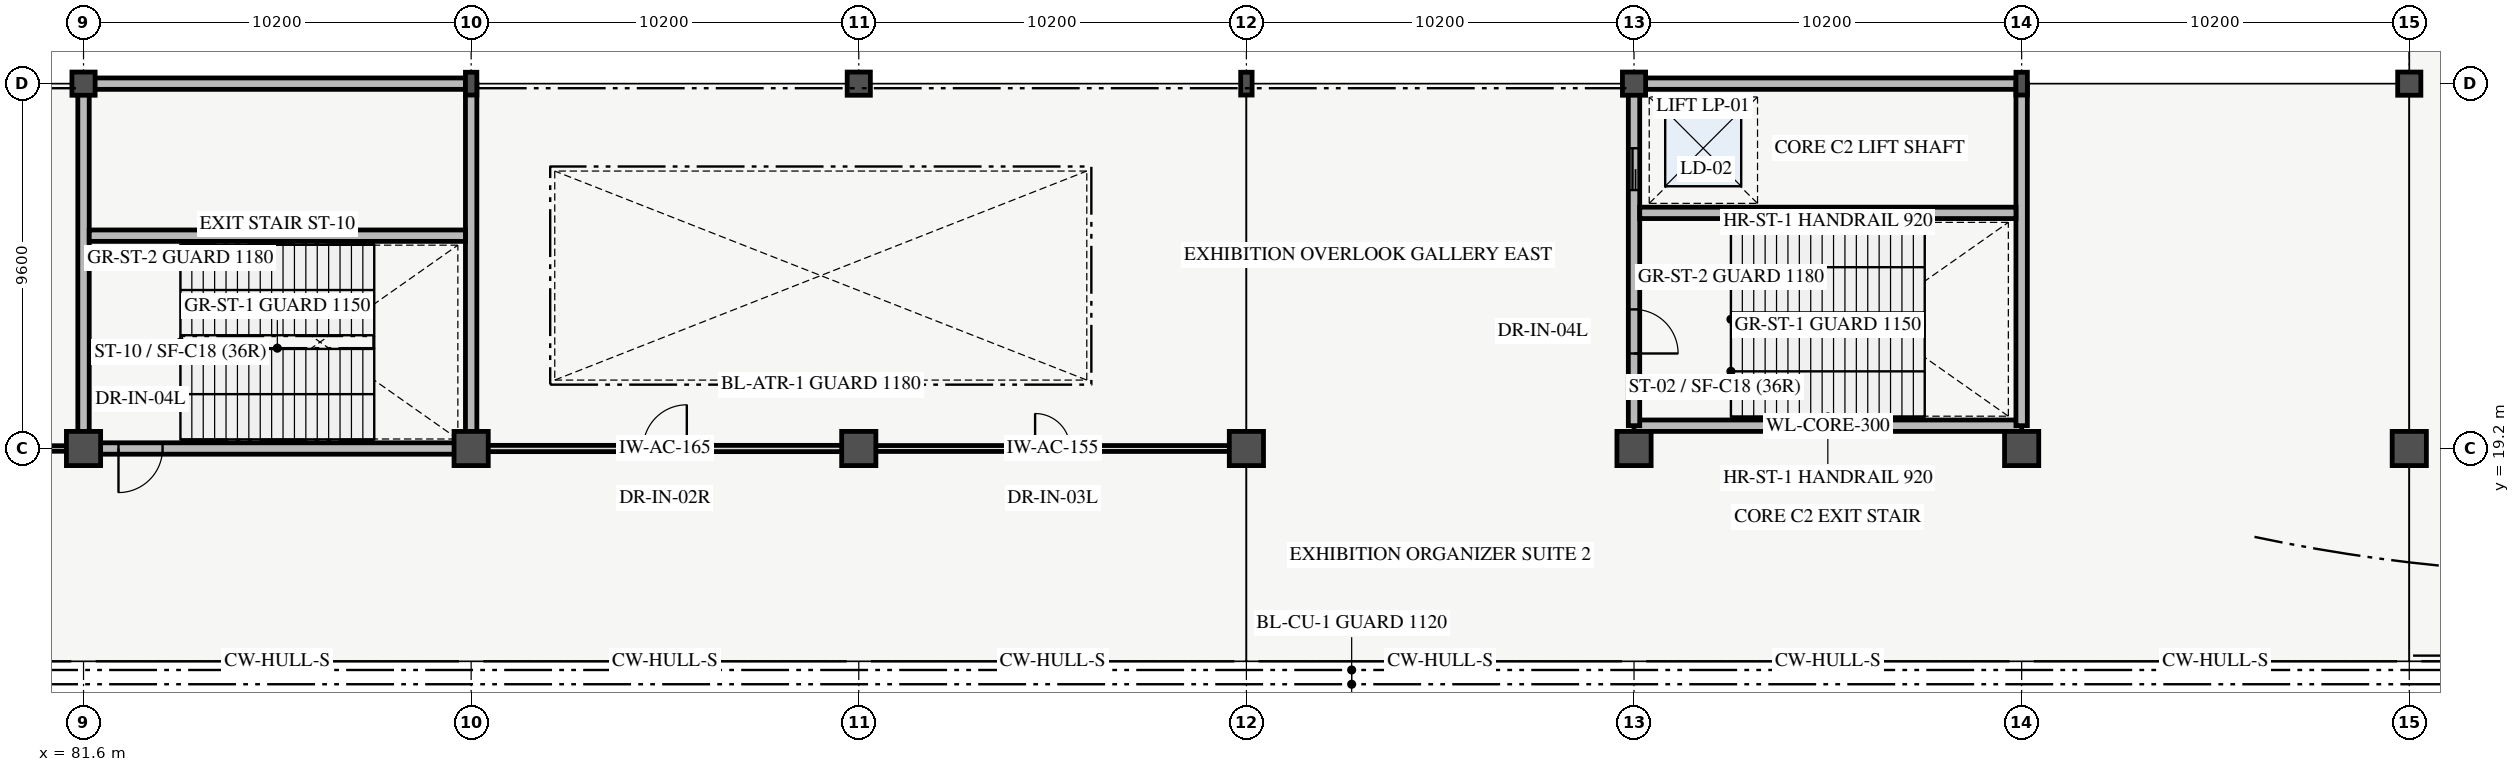
"""IFC4 building model, lengths in metres.
Left out: names, types, materials, properties, quantities, classifications, styles, units other than length and angle.
Written with IfcOpenShell. Run it as: python <this file> out.ifc"""

import sys

from ifc_helpers import new_model, si_unit, direction, frame, frame_2d, origin, origin_2d, place, context, subcontext, project, spatial, rectangle, hollow_circle, i_section, extrude, element, fill, save


model = new_model("IFC4")
c1 = context("Model", 3, precision=1e-05, world=origin(), true_north=direction((0.0, 1.0)))
c2 = subcontext(c1, "Body", "Model", "MODEL_VIEW")
j1 = project(units=[si_unit("LENGTHUNIT", "METRE"), si_unit("PLANEANGLEUNIT", "RADIAN")], contexts=[c1])
p1 = place(None, origin())
s1 = spatial("IfcSite", under=j1, at=p1, CompositionType="ELEMENT")
p2 = place(p1, origin())
s2 = spatial("IfcBuilding", under=s1, at=p2, CompositionType="ELEMENT")
p3 = place(p2, frame((0.0, 0.0, 5.4)))
s3 = spatial("IfcBuildingStorey", under=s2, at=p3, CompositionType="ELEMENT", Elevation=5.4)
p4 = place(p3, frame((81.6, 19.2, 0.0), z_axis=(0.0, 0.0, 1.0), x_axis=(1.0, 0.0, 0.0)))
e1 = element("IfcColumn", 1, at=p4, inside=s3, PredefinedType="COLUMN", context=c2, shape_type="SweptSolid", body=[
    extrude(rectangle(XDim=0.9, YDim=0.9, at=origin_2d()), origin(), (0.0, 0.0, 1.0), 5.4),
])
p5 = place(p3, frame((81.6, 28.8, 0.0), z_axis=(0.0, 0.0, 1.0), x_axis=(1.0, 0.0, 0.0)))
e2 = element("IfcColumn", 2, at=p5, inside=s3, PredefinedType="COLUMN", context=c2, shape_type="SweptSolid", body=[
    extrude(hollow_circle(Radius=0.305, WallThickness=0.025, at=origin_2d()), origin(), (0.0, 0.0, 1.0), 5.4),
])
p6 = place(p3, frame((91.8, 19.2, 0.0), z_axis=(0.0, 0.0, 1.0), x_axis=(1.0, 0.0, 0.0)))
e3 = element("IfcColumn", 3, at=p6, inside=s3, PredefinedType="COLUMN", context=c2, shape_type="SweptSolid", body=[
    extrude(rectangle(XDim=0.9, YDim=0.9, at=origin_2d()), origin(), (0.0, 0.0, 1.0), 5.4),
])
p7 = place(p3, frame((91.8, 28.8, 0.0), z_axis=(0.0, 0.0, 1.0), x_axis=(1.0, 0.0, 0.0)))
e4 = element("IfcColumn", 4, at=p7, inside=s3, PredefinedType="COLUMN", context=c2, shape_type="SweptSolid", body=[
    extrude(i_section(OverallWidth=0.3, OverallDepth=0.6, WebThickness=0.015, FlangeThickness=0.03, FilletRadius=0.027, at=origin_2d()), origin(), (0.0, 0.0, 1.0), 5.4),
])
p8 = place(p3, frame((102.0, 19.2, 0.0), z_axis=(0.0, 0.0, 1.0), x_axis=(1.0, 0.0, 0.0)))
e5 = element("IfcColumn", 5, at=p8, inside=s3, PredefinedType="COLUMN", context=c2, shape_type="SweptSolid", body=[
    extrude(rectangle(XDim=0.9, YDim=0.9, at=origin_2d()), origin(), (0.0, 0.0, 1.0), 5.4),
])
p9 = place(p3, frame((102.0, 28.8, 0.0), z_axis=(0.0, 0.0, 1.0), x_axis=(1.0, 0.0, 0.0)))
e6 = element("IfcColumn", 6, at=p9, inside=s3, PredefinedType="COLUMN", context=c2, shape_type="SweptSolid", body=[
    extrude(hollow_circle(Radius=0.305, WallThickness=0.025, at=origin_2d()), origin(), (0.0, 0.0, 1.0), 5.4),
])
p10 = place(p3, frame((112.2, 19.2, 0.0), z_axis=(0.0, 0.0, 1.0), x_axis=(1.0, 0.0, 0.0)))
e7 = element("IfcColumn", 7, at=p10, inside=s3, PredefinedType="COLUMN", context=c2, shape_type="SweptSolid", body=[
    extrude(rectangle(XDim=0.9, YDim=0.9, at=origin_2d()), origin(), (0.0, 0.0, 1.0), 5.4),
])
p11 = place(p3, frame((112.2, 28.8, 0.0), z_axis=(0.0, 0.0, 1.0), x_axis=(1.0, 0.0, 0.0)))
e8 = element("IfcColumn", 8, at=p11, inside=s3, PredefinedType="COLUMN", context=c2, shape_type="SweptSolid", body=[
    extrude(i_section(OverallWidth=0.3, OverallDepth=0.6, WebThickness=0.015, FlangeThickness=0.03, FilletRadius=0.027, at=origin_2d()), origin(), (0.0, 0.0, 1.0), 5.4),
])
p12 = place(p3, frame((122.4, 19.2, 0.0), z_axis=(0.0, 0.0, 1.0), x_axis=(1.0, 0.0, 0.0)))
e9 = element("IfcColumn", 9, at=p12, inside=s3, PredefinedType="COLUMN", context=c2, shape_type="SweptSolid", body=[
    extrude(rectangle(XDim=0.9, YDim=0.9, at=origin_2d()), origin(), (0.0, 0.0, 1.0), 5.4),
])
p13 = place(p3, frame((122.4, 28.8, 0.0), z_axis=(0.0, 0.0, 1.0), x_axis=(1.0, 0.0, 0.0)))
e10 = element("IfcColumn", 10, at=p13, inside=s3, PredefinedType="COLUMN", context=c2, shape_type="SweptSolid", body=[
    extrude(hollow_circle(Radius=0.305, WallThickness=0.025, at=origin_2d()), origin(), (0.0, 0.0, 1.0), 5.4),
])
p14 = place(p3, frame((132.6, 19.2, 0.0), z_axis=(0.0, 0.0, 1.0), x_axis=(1.0, 0.0, 0.0)))
e11 = element("IfcColumn", 11, at=p14, inside=s3, PredefinedType="COLUMN", context=c2, shape_type="SweptSolid", body=[
    extrude(rectangle(XDim=0.9, YDim=0.9, at=origin_2d()), origin(), (0.0, 0.0, 1.0), 5.4),
])
p15 = place(p3, frame((132.6, 28.8, 0.0), z_axis=(0.0, 0.0, 1.0), x_axis=(1.0, 0.0, 0.0)))
e12 = element("IfcColumn", 12, at=p15, inside=s3, PredefinedType="COLUMN", context=c2, shape_type="SweptSolid", body=[
    extrude(i_section(OverallWidth=0.3, OverallDepth=0.6, WebThickness=0.015, FlangeThickness=0.03, FilletRadius=0.027, at=origin_2d()), origin(), (0.0, 0.0, 1.0), 5.4),
])
p16 = place(p3, frame((142.8, 19.2, 0.0), z_axis=(0.0, 0.0, 1.0), x_axis=(1.0, 0.0, 0.0)))
e13 = element("IfcColumn", 13, at=p16, inside=s3, PredefinedType="COLUMN", context=c2, shape_type="SweptSolid", body=[
    extrude(rectangle(XDim=0.9, YDim=0.9, at=origin_2d()), origin(), (0.0, 0.0, 1.0), 5.4),
])
p17 = place(p3, frame((142.8, 28.8, 0.0), z_axis=(0.0, 0.0, 1.0), x_axis=(1.0, 0.0, 0.0)))
e14 = element("IfcColumn", 14, at=p17, inside=s3, PredefinedType="COLUMN", context=c2, shape_type="SweptSolid", body=[
    extrude(hollow_circle(Radius=0.305, WallThickness=0.025, at=origin_2d()), origin(), (0.0, 0.0, 1.0), 5.4),
])
for number, where, z_axis, x_axis in (
    (15, (122.4, 19.8, 0.0), (0.0, 0.0, 1.0), (1.0, 0.0, 0.0)),
    (16, (122.4, 28.8, 0.0), (0.0, 0.0, 1.0), (1.0, 0.0, 0.0)),
):
    element("IfcWall", number, at=place(p3, frame(where, z_axis=z_axis, x_axis=x_axis)), inside=s3, PredefinedType="SHEAR", context=c2, shape_type="SweptSolid", body=[
        extrude(rectangle(XDim=10.2, YDim=0.3, at=frame_2d((5.1, 0.0))), origin(), (0.0, 0.0, 1.0), 5.4),
    ])
p18 = place(p3, frame((122.4, 19.8, 0.0), z_axis=(0.0, 0.0, 1.0), x_axis=(0.0, 1.0, 0.0)))
e17 = element("IfcWall", 17, at=p18, inside=s3, PredefinedType="SHEAR", context=c2, shape_type="SweptSolid", body=[
    extrude(rectangle(XDim=9.0, YDim=0.3, at=frame_2d((4.5, 0.0))), origin(), (0.0, 0.0, 1.0), 5.4),
])
p19 = place(p18, frame((1.9, 0.0, 0.0)))
e18 = element("IfcOpeningElement", 18, at=p19, cuts=e17, PredefinedType="OPENING", context=c2, shape_type="SweptSolid", body=[
    extrude(rectangle(XDim=1.16, YDim=2.2, at=frame_2d((0.58, 1.1))), frame((0.0, 0.16, 0.0), z_axis=(0.0, -1.0, 0.0), x_axis=(1.0, 0.0, 0.0)), (0.0, 0.0, 1.0), 0.32),
])
p20 = place(p18, frame((6.2, 0.0, 0.0)))
e19 = element("IfcOpeningElement", 19, at=p20, cuts=e17, PredefinedType="OPENING", context=c2, shape_type="SweptSolid", body=[
    extrude(rectangle(XDim=1.1, YDim=2.2, at=frame_2d((0.55, 1.1))), frame((0.0, 0.16, 0.0), z_axis=(0.0, -1.0, 0.0), x_axis=(1.0, 0.0, 0.0)), (0.0, 0.0, 1.0), 0.32),
])
p21 = place(p3, frame((132.6, 19.8, 0.0), z_axis=(0.0, 0.0, 1.0), x_axis=(0.0, 1.0, 0.0)))
e20 = element("IfcWall", 20, at=p21, inside=s3, PredefinedType="SHEAR", context=c2, shape_type="SweptSolid", body=[
    extrude(rectangle(XDim=9.0, YDim=0.3, at=frame_2d((4.5, 0.0))), origin(), (0.0, 0.0, 1.0), 5.4),
])
p22 = place(p3, frame((122.55, 25.4, 0.0), z_axis=(0.0, 0.0, 1.0), x_axis=(1.0, 0.0, 0.0)))
e21 = element("IfcWall", 21, at=p22, inside=s3, PredefinedType="SHEAR", context=c2, shape_type="SweptSolid", body=[
    extrude(rectangle(XDim=9.9, YDim=0.3, at=frame_2d((4.95, 0.0))), origin(), (0.0, 0.0, 1.0), 5.4),
])
p23 = place(p3, frame((81.6, 19.2, 0.0), z_axis=(0.0, 0.0, 1.0), x_axis=(1.0, 0.0, 0.0)))
e22 = element("IfcWall", 22, at=p23, inside=s3, PredefinedType="SHEAR", context=c2, shape_type="SweptSolid", body=[
    extrude(rectangle(XDim=10.2, YDim=0.3, at=frame_2d((5.1, 0.0))), origin(), (0.0, 0.0, 1.0), 5.4),
])
p24 = place(p23, frame((0.92, 0.0, 0.0)))
e23 = element("IfcOpeningElement", 23, at=p24, cuts=e22, PredefinedType="OPENING", context=c2, shape_type="SweptSolid", body=[
    extrude(rectangle(XDim=1.16, YDim=2.2, at=frame_2d((0.58, 1.1))), frame((0.0, 0.16, 0.0), z_axis=(0.0, -1.0, 0.0), x_axis=(1.0, 0.0, 0.0)), (0.0, 0.0, 1.0), 0.32),
])
p25 = place(p3, frame((81.6, 28.8, 0.0), z_axis=(0.0, 0.0, 1.0), x_axis=(1.0, 0.0, 0.0)))
e24 = element("IfcWall", 24, at=p25, inside=s3, PredefinedType="SHEAR", context=c2, shape_type="SweptSolid", body=[
    extrude(rectangle(XDim=10.2, YDim=0.3, at=frame_2d((5.1, 0.0))), origin(), (0.0, 0.0, 1.0), 5.4),
])
for number, where, z_axis, x_axis in (
    (25, (81.6, 19.2, 0.0), (0.0, 0.0, 1.0), (0.0, 1.0, 0.0)),
    (26, (91.8, 19.2, 0.0), (0.0, 0.0, 1.0), (0.0, 1.0, 0.0)),
):
    element("IfcWall", number, at=place(p3, frame(where, z_axis=z_axis, x_axis=x_axis)), inside=s3, PredefinedType="SHEAR", context=c2, shape_type="SweptSolid", body=[
        extrude(rectangle(XDim=9.6, YDim=0.3, at=frame_2d((4.8, 0.0))), origin(), (0.0, 0.0, 1.0), 5.4),
    ])
p26 = place(p3, frame((81.75, 24.8, 0.0), z_axis=(0.0, 0.0, 1.0), x_axis=(1.0, 0.0, 0.0)))
e27 = element("IfcWall", 27, at=p26, inside=s3, PredefinedType="SHEAR", context=c2, shape_type="SweptSolid", body=[
    extrude(rectangle(XDim=9.9, YDim=0.3, at=frame_2d((4.95, 0.0))), origin(), (0.0, 0.0, 1.0), 5.4),
])
p27 = place(p3, frame((92.2, 19.2, 0.0), z_axis=(0.0, 0.0, 1.0), x_axis=(1.0, 0.0, 0.0)))
e28 = element("IfcWall", 28, at=p27, inside=s3, PredefinedType="PARTITIONING", context=c2, shape_type="SweptSolid", body=[
    extrude(rectangle(XDim=9.4, YDim=0.165, at=frame_2d((4.7, 0.0))), origin(), (0.0, 0.0, 1.0), 4.2),
])
p28 = place(p27, frame((4.125, 0.0, 0.0)))
e29 = element("IfcOpeningElement", 29, at=p28, cuts=e28, PredefinedType="OPENING", context=c2, shape_type="SweptSolid", body=[
    extrude(rectangle(XDim=1.15, YDim=2.2, at=frame_2d((0.575, 1.1))), frame((0.0, 0.093, 0.0), z_axis=(0.0, -1.0, 0.0), x_axis=(1.0, 0.0, 0.0)), (0.0, 0.0, 1.0), 0.185),
])
p29 = place(p3, frame((102.4, 19.2, 0.0), z_axis=(0.0, 0.0, 1.0), x_axis=(1.0, 0.0, 0.0)))
e30 = element("IfcWall", 30, at=p29, inside=s3, PredefinedType="PARTITIONING", context=c2, shape_type="SweptSolid", body=[
    extrude(rectangle(XDim=9.4, YDim=0.155, at=frame_2d((4.7, 0.0))), origin(), (0.0, 0.0, 1.0), 4.2),
])
p30 = place(p29, frame((4.24, 0.0, 0.0)))
e31 = element("IfcOpeningElement", 31, at=p30, cuts=e30, PredefinedType="OPENING", context=c2, shape_type="SweptSolid", body=[
    extrude(rectangle(XDim=0.92, YDim=2.1, at=frame_2d((0.46, 1.05))), frame((0.0, 0.087, 0.0), z_axis=(0.0, -1.0, 0.0), x_axis=(1.0, 0.0, 0.0)), (0.0, 0.0, 1.0), 0.175),
])
p31 = place(p3, frame((71.8, 19.2, 0.0), z_axis=(0.0, 0.0, 1.0), x_axis=(1.0, 0.0, 0.0)))
e32 = element("IfcWall", 32, at=p31, inside=s3, PredefinedType="PARTITIONING", context=c2, shape_type="SweptSolid", body=[
    extrude(rectangle(XDim=9.4, YDim=0.145, at=frame_2d((4.7, 0.0))), origin(), (0.0, 0.0, 1.0), 4.2),
])
p32 = place(p31, frame((4.08, 0.0, 0.0)))
e33 = element("IfcOpeningElement", 33, at=p32, cuts=e32, PredefinedType="OPENING", context=c2, shape_type="SweptSolid", body=[
    extrude(rectangle(XDim=1.24, YDim=2.2, at=frame_2d((0.62, 1.1))), frame((0.0, 0.083, 0.0), z_axis=(0.0, -1.0, 0.0), x_axis=(1.0, 0.0, 0.0)), (0.0, 0.0, 1.0), 0.165),
])
p33 = place(p19, origin())
e34 = element("IfcDoor", 34, at=p33, inside=s3, OperationType="SINGLE_SWING_LEFT", PredefinedType="DOOR", context=c2, shape_type="SweptSolid", body=[
    extrude(rectangle(XDim=1.16, YDim=2.2, at=frame_2d((0.58, 1.1))), frame((0.0, 0.025, 0.0), z_axis=(0.0, -1.0, 0.0), x_axis=(1.0, 0.0, 0.0)), (0.0, 0.0, 1.0), 0.05),
])
fill(e18, e34)
p34 = place(p20, origin())
e35 = element("IfcDoor", 35, at=p34, inside=s3, OperationType="SLIDING_TO_RIGHT", PredefinedType="DOOR", context=c2, shape_type="SweptSolid", body=[
    extrude(rectangle(XDim=1.1, YDim=2.2, at=frame_2d((0.55, 1.1))), frame((0.0, 0.025, 0.0), z_axis=(0.0, -1.0, 0.0), x_axis=(1.0, 0.0, 0.0)), (0.0, 0.0, 1.0), 0.05),
])
fill(e19, e35)
p35 = place(p24, origin())
e36 = element("IfcDoor", 36, at=p35, inside=s3, OperationType="SINGLE_SWING_LEFT", PredefinedType="DOOR", context=c2, shape_type="SweptSolid", body=[
    extrude(rectangle(XDim=1.16, YDim=2.2, at=frame_2d((0.58, 1.1))), frame((0.0, 0.025, 0.0), z_axis=(0.0, -1.0, 0.0), x_axis=(1.0, 0.0, 0.0)), (0.0, 0.0, 1.0), 0.05),
])
fill(e23, e36)
p36 = place(p28, origin())
e37 = element("IfcDoor", 37, at=p36, inside=s3, OperationType="SINGLE_SWING_RIGHT", PredefinedType="DOOR", context=c2, shape_type="SweptSolid", body=[
    extrude(rectangle(XDim=1.15, YDim=2.2, at=frame_2d((0.575, 1.1))), frame((0.0, 0.025, 0.0), z_axis=(0.0, -1.0, 0.0), x_axis=(1.0, 0.0, 0.0)), (0.0, 0.0, 1.0), 0.05),
])
fill(e29, e37)
p37 = place(p30, origin())
e38 = element("IfcDoor", 38, at=p37, inside=s3, OperationType="SINGLE_SWING_LEFT", PredefinedType="DOOR", context=c2, shape_type="SweptSolid", body=[
    extrude(rectangle(XDim=0.92, YDim=2.1, at=frame_2d((0.46, 1.05))), frame((0.0, 0.025, 0.0), z_axis=(0.0, -1.0, 0.0), x_axis=(1.0, 0.0, 0.0)), (0.0, 0.0, 1.0), 0.05),
])
fill(e31, e38)
save(model, sys.argv[1])
